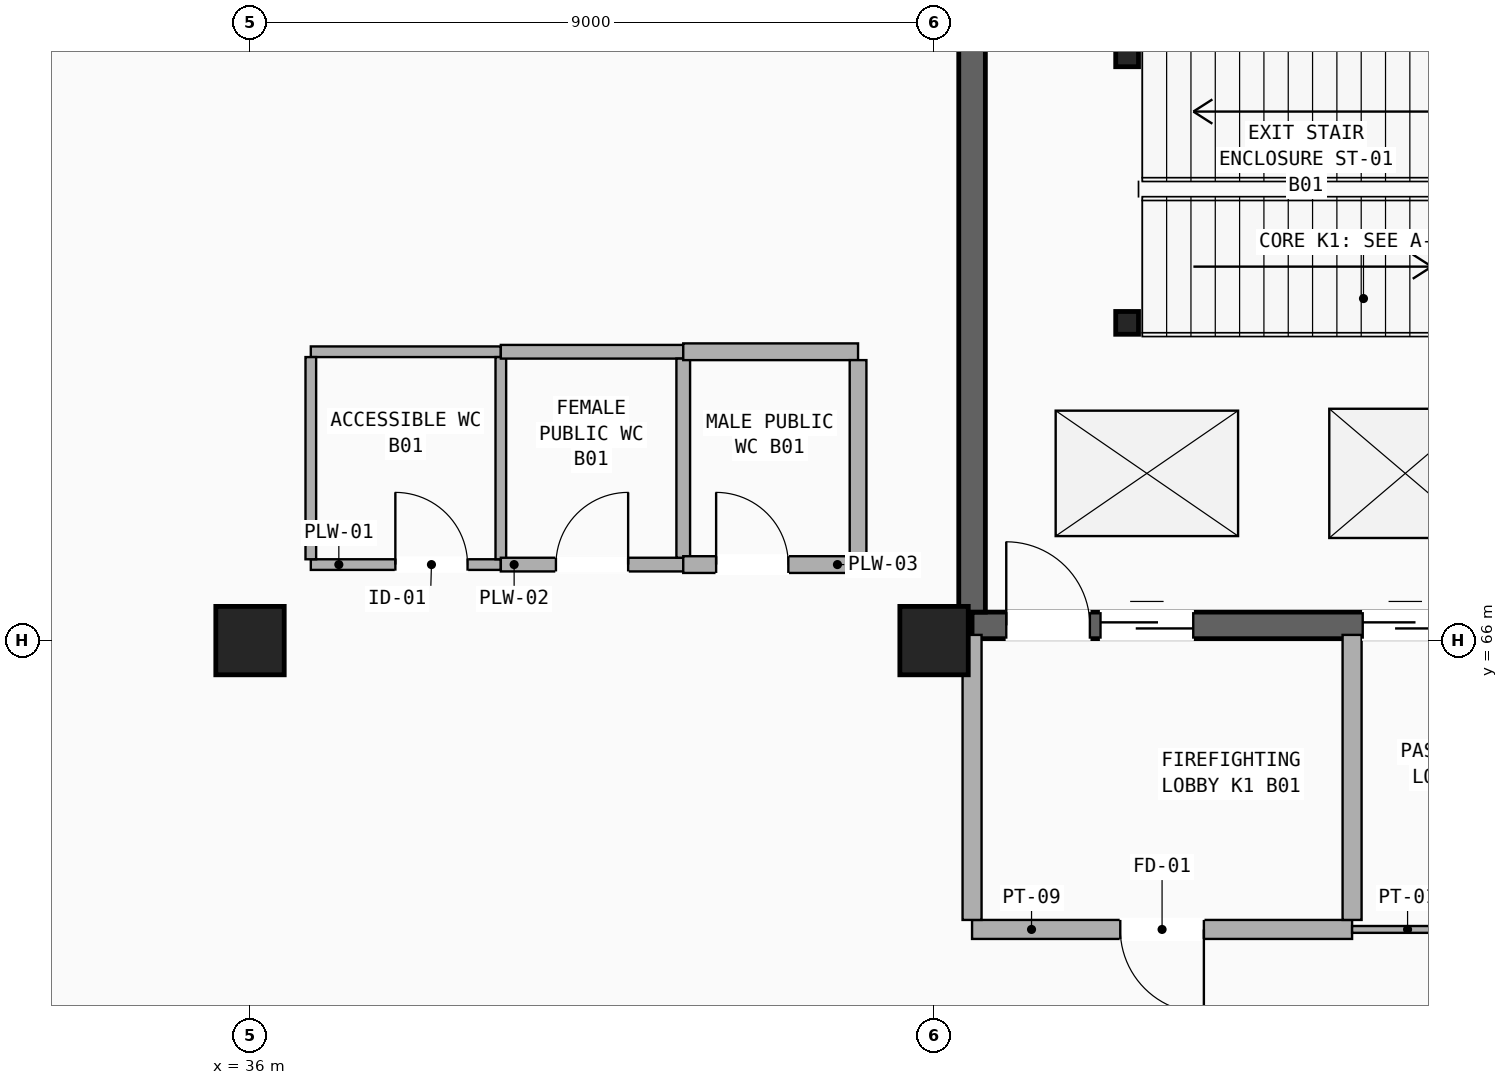
"""IFC4 building model, lengths in metres.
Left out: names, types, materials, properties, quantities, classifications, styles, units other than length and angle.
Written with IfcOpenShell. Run it as: python <this file> out.ifc"""

import sys

from ifc_helpers import new_model, si_unit, direction, frame, frame_2d, origin, origin_2d, place, context, subcontext, project, spatial, rectangle, hollow_rectangle, extrude, element, fill, save


model = new_model("IFC4")
c1 = context("Model", 3, precision=1e-05, world=origin(), true_north=direction((0.0, 1.0)))
c2 = subcontext(c1, "Body", "Model", "MODEL_VIEW")
j1 = project(units=[si_unit("LENGTHUNIT", "METRE"), si_unit("PLANEANGLEUNIT", "RADIAN")], contexts=[c1])
p1 = place(None, origin())
s1 = spatial("IfcSite", under=j1, at=p1, CompositionType="ELEMENT")
p2 = place(p1, origin())
s2 = spatial("IfcBuilding", under=s1, at=p2, CompositionType="ELEMENT")
p3 = place(p2, frame((0.0, 0.0, -5.1)))
s3 = spatial("IfcBuildingStorey", under=s2, at=p3, CompositionType="ELEMENT", Elevation=-5.1)
for number, where, z_axis, x_axis in (
    (1, (36.0, 66.0, 0.0), (0.0, 0.0, 1.0), (1.0, 0.0, 0.0)),
    (2, (45.0, 66.0, 0.0), (0.0, 0.0, 1.0), (1.0, 0.0, 0.0)),
):
    element("IfcColumn", number, at=place(p3, frame(where, z_axis=z_axis, x_axis=x_axis)), inside=s3, PredefinedType="COLUMN", context=c2, shape_type="SweptSolid", body=[
        extrude(rectangle(XDim=0.9, YDim=0.9, at=origin_2d()), origin(), (0.0, 0.0, 1.0), 5.1),
    ])
p4 = place(p3, frame((45.5, 66.2, 0.0), z_axis=(0.0, 0.0, 1.0), x_axis=(1.0, 0.0, 0.0)))
e3 = element("IfcWall", 3, at=p4, inside=s3, PredefinedType="SHEAR", context=c2, shape_type="SweptSolid", body=[
    extrude(rectangle(XDim=10.3, YDim=0.35, at=frame_2d((5.15, 0.0))), origin(), (0.0, 0.0, 1.0), 5.1),
])
p5 = place(p4, frame((0.45, 0.0, 0.0)))
e4 = element("IfcOpeningElement", 4, at=p5, cuts=e3, PredefinedType="OPENING", context=c2, shape_type="SweptSolid", body=[
    extrude(rectangle(XDim=1.1, YDim=2.2, at=frame_2d((0.55, 1.1))), frame((0.0, 0.185, 0.0), z_axis=(0.0, -1.0, 0.0), x_axis=(1.0, 0.0, 0.0)), (0.0, 0.0, 1.0), 0.37),
])
p6 = place(p4, frame((1.69, 0.0, 0.0)))
e5 = element("IfcOpeningElement", 5, at=p6, cuts=e3, PredefinedType="OPENING", context=c2, shape_type="SweptSolid", body=[
    extrude(rectangle(XDim=1.22, YDim=2.2, at=frame_2d((0.61, 1.1))), frame((0.0, 0.185, 0.0), z_axis=(0.0, -1.0, 0.0), x_axis=(1.0, 0.0, 0.0)), (0.0, 0.0, 1.0), 0.37),
])
p7 = place(p4, frame((5.14, 0.0, 0.0)))
e6 = element("IfcOpeningElement", 6, at=p7, cuts=e3, PredefinedType="OPENING", context=c2, shape_type="SweptSolid", body=[
    extrude(rectangle(XDim=1.12, YDim=2.16, at=frame_2d((0.56, 1.08))), frame((0.0, 0.185, 0.0), z_axis=(0.0, -1.0, 0.0), x_axis=(1.0, 0.0, 0.0)), (0.0, 0.0, 1.0), 0.37),
])
p8 = place(p3, frame((45.5, 66.375, 0.0), z_axis=(0.0, 0.0, 1.0), x_axis=(0.0, 1.0, 0.0)))
e7 = element("IfcWall", 7, at=p8, inside=s3, PredefinedType="SHEAR", context=c2, shape_type="SweptSolid", body=[
    extrude(rectangle(XDim=8.25, YDim=0.35, at=frame_2d((4.125, 0.0))), origin(), (0.0, 0.0, 1.0), 5.1),
])
for number, where, z_axis, x_axis in (
    (8, (47.54, 70.18, 0.0), (0.0, 0.0, 1.0), (1.0, 0.0, 0.0)),
    (9, (47.54, 73.7, 0.0), (0.0, 0.0, 1.0), (1.0, 0.0, 0.0)),
):
    element("IfcColumn", number, at=place(p3, frame(where, z_axis=z_axis, x_axis=x_axis)), inside=s3, PredefinedType="COLUMN", context=c2, shape_type="SweptSolid", body=[
        extrude(hollow_rectangle(XDim=0.3, YDim=0.3, WallThickness=0.016, InnerFilletRadius=0.016, OuterFilletRadius=0.032, at=origin_2d()), origin(), (0.0, 0.0, 1.0), 5.1),
    ])
p9 = place(p3, frame((45.5, 62.2, 0.0), z_axis=(0.0, 0.0, 1.0), x_axis=(1.0, 0.0, 0.0)))
e10 = element("IfcWall", 10, at=p9, inside=s3, PredefinedType="PARTITIONING", context=c2, shape_type="SweptSolid", body=[
    extrude(rectangle(XDim=5.0, YDim=0.25, at=frame_2d((2.5, 0.0))), origin(), (0.0, 0.0, 1.0), 4.78),
])
p10 = place(p9, frame((1.95, 0.0, 0.0)))
e11 = element("IfcOpeningElement", 11, at=p10, cuts=e10, PredefinedType="OPENING", context=c2, shape_type="SweptSolid", body=[
    extrude(rectangle(XDim=1.1, YDim=2.2, at=frame_2d((0.55, 1.1))), frame((0.0, 0.135, 0.0), z_axis=(0.0, -1.0, 0.0), x_axis=(1.0, 0.0, 0.0)), (0.0, 0.0, 1.0), 0.27),
])
for number, where, z_axis, x_axis in (
    (12, (45.5, 62.325, 0.0), (0.0, 0.0, 1.0), (0.0, 1.0, 0.0)),
    (13, (50.5, 62.325, 0.0), (0.0, 0.0, 1.0), (0.0, 1.0, 0.0)),
):
    element("IfcWall", number, at=place(p3, frame(where, z_axis=z_axis, x_axis=x_axis)), inside=s3, PredefinedType="PARTITIONING", context=c2, shape_type="SweptSolid", body=[
        extrude(rectangle(XDim=3.75, YDim=0.25, at=frame_2d((1.875, 0.0))), origin(), (0.0, 0.0, 1.0), 4.05),
    ])
p11 = place(p3, frame((50.5, 62.2, 0.0), z_axis=(0.0, 0.0, 1.0), x_axis=(1.0, 0.0, 0.0)))
e14 = element("IfcWall", 14, at=p11, inside=s3, PredefinedType="PARTITIONING", context=c2, shape_type="SweptSolid", body=[
    extrude(rectangle(XDim=5.3, YDim=0.09, at=frame_2d((2.65, 0.0))), origin(), (0.0, 0.0, 1.0), 3.95),
])
p12 = place(p11, frame((1.95, 0.0, 0.0)))
e15 = element("IfcOpeningElement", 15, at=p12, cuts=e14, PredefinedType="OPENING", context=c2, shape_type="SweptSolid", body=[
    extrude(rectangle(XDim=1.4, YDim=2.2, at=frame_2d((0.7, 1.1))), frame((0.0, 0.055, 0.0), z_axis=(0.0, -1.0, 0.0), x_axis=(1.0, 0.0, 0.0)), (0.0, 0.0, 1.0), 0.11),
])
p13 = place(p3, frame((36.8, 67.0, 0.0), z_axis=(0.0, 0.0, 1.0), x_axis=(1.0, 0.0, 0.0)))
e16 = element("IfcWall", 16, at=p13, inside=s3, PredefinedType="PLUMBINGWALL", context=c2, shape_type="SweptSolid", body=[
    extrude(rectangle(XDim=2.5, YDim=0.14, at=frame_2d((1.25, 0.0))), origin(), (0.0, 0.0, 1.0), 4.78),
])
p14 = place(p13, frame((1.112, 0.0, 0.0)))
e17 = element("IfcOpeningElement", 17, at=p14, cuts=e16, PredefinedType="OPENING", context=c2, shape_type="SweptSolid", body=[
    extrude(rectangle(XDim=0.95, YDim=2.15, at=frame_2d((0.475, 1.075))), frame((0.0, 0.08, 0.0), z_axis=(0.0, -1.0, 0.0), x_axis=(1.0, 0.0, 0.0)), (0.0, 0.0, 1.0), 0.16),
])
p15 = place(p3, frame((36.8, 69.8, 0.0), z_axis=(0.0, 0.0, 1.0), x_axis=(1.0, 0.0, 0.0)))
e18 = element("IfcWall", 18, at=p15, inside=s3, PredefinedType="PLUMBINGWALL", context=c2, shape_type="SweptSolid", body=[
    extrude(rectangle(XDim=2.5, YDim=0.14, at=frame_2d((1.25, 0.0))), origin(), (0.0, 0.0, 1.0), 4.78),
])
for number, where, z_axis, x_axis in (
    (19, (36.8, 67.07, 0.0), (0.0, 0.0, 1.0), (0.0, 1.0, 0.0)),
    (20, (39.3, 67.07, 0.0), (0.0, 0.0, 1.0), (0.0, 1.0, 0.0)),
):
    element("IfcWall", number, at=place(p3, frame(where, z_axis=z_axis, x_axis=x_axis)), inside=s3, PredefinedType="PLUMBINGWALL", context=c2, shape_type="SweptSolid", body=[
        extrude(rectangle(XDim=2.66, YDim=0.14, at=frame_2d((1.33, 0.0))), origin(), (0.0, 0.0, 1.0), 4.78),
    ])
p16 = place(p3, frame((39.3, 67.0, 0.0), z_axis=(0.0, 0.0, 1.0), x_axis=(1.0, 0.0, 0.0)))
e21 = element("IfcWall", 21, at=p16, inside=s3, PredefinedType="PLUMBINGWALL", context=c2, shape_type="SweptSolid", body=[
    extrude(rectangle(XDim=2.4, YDim=0.18, at=frame_2d((1.2, 0.0))), origin(), (0.0, 0.0, 1.0), 4.78),
])
p17 = place(p16, frame((0.725, 0.0, 0.0)))
e22 = element("IfcOpeningElement", 22, at=p17, cuts=e21, PredefinedType="OPENING", context=c2, shape_type="SweptSolid", body=[
    extrude(rectangle(XDim=0.95, YDim=2.15, at=frame_2d((0.475, 1.075))), frame((0.0, 0.1, 0.0), z_axis=(0.0, -1.0, 0.0), x_axis=(1.0, 0.0, 0.0)), (0.0, 0.0, 1.0), 0.2),
])
p18 = place(p3, frame((39.3, 69.8, 0.0), z_axis=(0.0, 0.0, 1.0), x_axis=(1.0, 0.0, 0.0)))
e23 = element("IfcWall", 23, at=p18, inside=s3, PredefinedType="PLUMBINGWALL", context=c2, shape_type="SweptSolid", body=[
    extrude(rectangle(XDim=2.4, YDim=0.18, at=frame_2d((1.2, 0.0))), origin(), (0.0, 0.0, 1.0), 4.78),
])
p19 = place(p3, frame((41.7, 67.09, 0.0), z_axis=(0.0, 0.0, 1.0), x_axis=(0.0, 1.0, 0.0)))
e24 = element("IfcWall", 24, at=p19, inside=s3, PredefinedType="PLUMBINGWALL", context=c2, shape_type="SweptSolid", body=[
    extrude(rectangle(XDim=2.62, YDim=0.18, at=frame_2d((1.31, 0.0))), origin(), (0.0, 0.0, 1.0), 4.78),
])
p20 = place(p3, frame((41.7, 67.0, 0.0), z_axis=(0.0, 0.0, 1.0), x_axis=(1.0, 0.0, 0.0)))
e25 = element("IfcWall", 25, at=p20, inside=s3, PredefinedType="PLUMBINGWALL", context=c2, shape_type="SweptSolid", body=[
    extrude(rectangle(XDim=2.3, YDim=0.22, at=frame_2d((1.15, 0.0))), origin(), (0.0, 0.0, 1.0), 4.78),
])
p21 = place(p20, frame((0.433, 0.0, 0.0)))
e26 = element("IfcOpeningElement", 26, at=p21, cuts=e25, PredefinedType="OPENING", context=c2, shape_type="SweptSolid", body=[
    extrude(rectangle(XDim=0.95, YDim=2.15, at=frame_2d((0.475, 1.075))), frame((0.0, 0.12, 0.0), z_axis=(0.0, -1.0, 0.0), x_axis=(1.0, 0.0, 0.0)), (0.0, 0.0, 1.0), 0.24),
])
p22 = place(p3, frame((41.7, 69.8, 0.0), z_axis=(0.0, 0.0, 1.0), x_axis=(1.0, 0.0, 0.0)))
e27 = element("IfcWall", 27, at=p22, inside=s3, PredefinedType="PLUMBINGWALL", context=c2, shape_type="SweptSolid", body=[
    extrude(rectangle(XDim=2.3, YDim=0.22, at=frame_2d((1.15, 0.0))), origin(), (0.0, 0.0, 1.0), 4.78),
])
p23 = place(p3, frame((44.0, 67.11, 0.0), z_axis=(0.0, 0.0, 1.0), x_axis=(0.0, 1.0, 0.0)))
e28 = element("IfcWall", 28, at=p23, inside=s3, PredefinedType="PLUMBINGWALL", context=c2, shape_type="SweptSolid", body=[
    extrude(rectangle(XDim=2.58, YDim=0.22, at=frame_2d((1.29, 0.0))), origin(), (0.0, 0.0, 1.0), 4.78),
])
p24 = place(p5, origin())
e29 = element("IfcDoor", 29, at=p24, inside=s3, OperationType="SINGLE_SWING_LEFT", PredefinedType="DOOR", context=c2, shape_type="SweptSolid", body=[
    extrude(rectangle(XDim=1.1, YDim=2.2, at=frame_2d((0.55, 1.1))), frame((0.0, 0.025, 0.0), z_axis=(0.0, -1.0, 0.0), x_axis=(1.0, 0.0, 0.0)), (0.0, 0.0, 1.0), 0.05),
])
fill(e4, e29)
p25 = place(p6, origin())
e30 = element("IfcDoor", 30, at=p25, inside=s3, OperationType="SLIDING_TO_LEFT", PredefinedType="DOOR", context=c2, shape_type="SweptSolid", body=[
    extrude(rectangle(XDim=1.22, YDim=2.2, at=frame_2d((0.61, 1.1))), frame((0.0, 0.025, 0.0), z_axis=(0.0, -1.0, 0.0), x_axis=(1.0, 0.0, 0.0)), (0.0, 0.0, 1.0), 0.05),
])
fill(e5, e30)
p26 = place(p7, origin())
e31 = element("IfcDoor", 31, at=p26, inside=s3, OperationType="SLIDING_TO_LEFT", PredefinedType="DOOR", context=c2, shape_type="SweptSolid", body=[
    extrude(rectangle(XDim=1.12, YDim=2.16, at=frame_2d((0.56, 1.08))), frame((0.0, 0.025, 0.0), z_axis=(0.0, -1.0, 0.0), x_axis=(1.0, 0.0, 0.0)), (0.0, 0.0, 1.0), 0.05),
])
fill(e6, e31)
p27 = place(p10, frame((1.1, 0.0, 0.0), z_axis=(0.0, 0.0, 1.0), x_axis=(-1.0, 0.0, 0.0)))
e32 = element("IfcDoor", 32, at=p27, inside=s3, OperationType="SINGLE_SWING_LEFT", PredefinedType="DOOR", context=c2, shape_type="SweptSolid", body=[
    extrude(rectangle(XDim=1.1, YDim=2.2, at=frame_2d((0.55, 1.1))), frame((0.0, 0.025, 0.0), z_axis=(0.0, -1.0, 0.0), x_axis=(1.0, 0.0, 0.0)), (0.0, 0.0, 1.0), 0.05),
])
fill(e11, e32)
p28 = place(p14, origin())
e33 = element("IfcDoor", 33, at=p28, inside=s3, OperationType="SINGLE_SWING_LEFT", PredefinedType="DOOR", context=c2, shape_type="SweptSolid", body=[
    extrude(rectangle(XDim=0.95, YDim=2.15, at=frame_2d((0.475, 1.075))), frame((0.0, 0.025, 0.0), z_axis=(0.0, -1.0, 0.0), x_axis=(1.0, 0.0, 0.0)), (0.0, 0.0, 1.0), 0.05),
])
fill(e17, e33)
p29 = place(p17, origin())
e34 = element("IfcDoor", 34, at=p29, inside=s3, OperationType="SINGLE_SWING_RIGHT", PredefinedType="DOOR", context=c2, shape_type="SweptSolid", body=[
    extrude(rectangle(XDim=0.95, YDim=2.15, at=frame_2d((0.475, 1.075))), frame((0.0, 0.025, 0.0), z_axis=(0.0, -1.0, 0.0), x_axis=(1.0, 0.0, 0.0)), (0.0, 0.0, 1.0), 0.05),
])
fill(e22, e34)
p30 = place(p21, origin())
e35 = element("IfcDoor", 35, at=p30, inside=s3, OperationType="SINGLE_SWING_LEFT", PredefinedType="DOOR", context=c2, shape_type="SweptSolid", body=[
    extrude(rectangle(XDim=0.95, YDim=2.15, at=frame_2d((0.475, 1.075))), frame((0.0, 0.025, 0.0), z_axis=(0.0, -1.0, 0.0), x_axis=(1.0, 0.0, 0.0)), (0.0, 0.0, 1.0), 0.05),
])
fill(e26, e35)
save(model, sys.argv[1])
